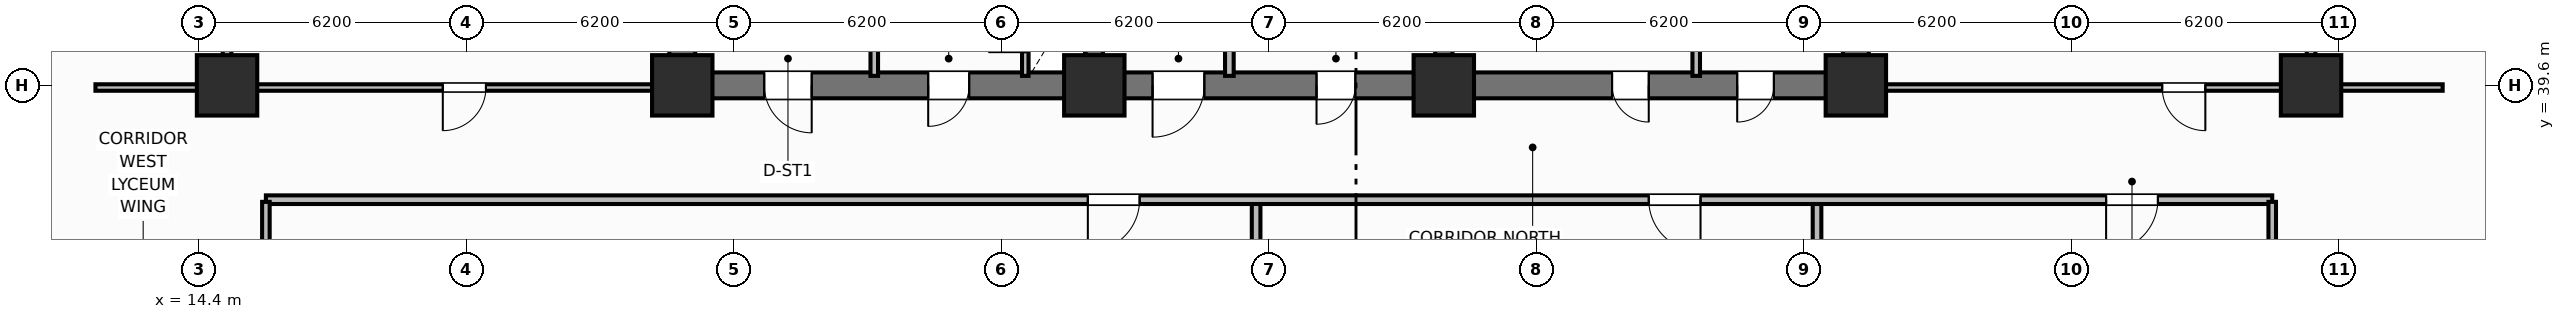
"""IFC4 building model, lengths in metres.
Left out: names, types, materials, properties, quantities, classifications, styles, units other than length and angle.
Written with IfcOpenShell. Run it as: python <this file> out.ifc"""

import sys

from ifc_helpers import new_model, si_unit, direction, frame, frame_2d, origin, origin_2d, place, context, subcontext, project, spatial, rectangle, extrude, element, fill, save


model = new_model("IFC4")
c1 = context("Model", 3, precision=1e-05, world=origin(), true_north=direction((0.0, 1.0)))
c2 = subcontext(c1, "Body", "Model", "MODEL_VIEW")
j1 = project(units=[si_unit("LENGTHUNIT", "METRE"), si_unit("PLANEANGLEUNIT", "RADIAN")], contexts=[c1])
p1 = place(None, origin())
s1 = spatial("IfcSite", under=j1, at=p1, CompositionType="ELEMENT")
p2 = place(p1, origin())
s2 = spatial("IfcBuilding", under=s1, at=p2, CompositionType="ELEMENT")
p3 = place(p2, frame((0.0, 0.0, 20.1)))
s3 = spatial("IfcBuildingStorey", under=s2, at=p3, CompositionType="ELEMENT", Elevation=20.1)
for number, where, z_axis, x_axis in (
    (1, (25.6, 39.9, 0.0), (0.0, 0.0, 1.0), (0.0, 1.0, 0.0)),
    (2, (52.8, 39.9, 0.0), (0.0, 0.0, 1.0), (0.0, 1.0, 0.0)),
):
    element("IfcWall", number, at=place(p3, frame(where, z_axis=z_axis, x_axis=x_axis)), inside=s3, PredefinedType="SHEAR", context=c2, shape_type="SweptSolid", body=[
        extrude(rectangle(XDim=5.6, YDim=0.6, at=frame_2d((2.8, 0.0))), origin(), (0.0, 0.0, 1.0), 4.5),
    ])
p4 = place(p3, frame((52.8, 39.6, 0.0), z_axis=(0.0, 0.0, 1.0), x_axis=(-1.0, 0.0, 0.0)))
e3 = element("IfcWall", 3, at=p4, inside=s3, PredefinedType="SHEAR", context=c2, shape_type="SweptSolid", body=[
    extrude(rectangle(XDim=27.2, YDim=0.6, at=frame_2d((13.6, 0.0))), origin(), (0.0, 0.0, 1.0), 4.5),
])
p5 = place(p4, frame((24.2, 0.0, 0.0)))
e4 = element("IfcOpeningElement", 4, at=p5, cuts=e3, PredefinedType="OPENING", context=c2, shape_type="SweptSolid", body=[
    extrude(rectangle(XDim=1.1, YDim=2.15, at=frame_2d((0.55, 1.075))), frame((0.0, 0.31, 0.0), z_axis=(0.0, -1.0, 0.0), x_axis=(1.0, 0.0, 0.0)), (0.0, 0.0, 1.0), 0.62),
])
p6 = place(p4, frame((20.55, 0.0, 0.0)))
e5 = element("IfcOpeningElement", 5, at=p6, cuts=e3, PredefinedType="OPENING", context=c2, shape_type="SweptSolid", body=[
    extrude(rectangle(XDim=0.95, YDim=2.1, at=frame_2d((0.475, 1.05))), frame((0.0, 0.31, 0.0), z_axis=(0.0, -1.0, 0.0), x_axis=(1.0, 0.0, 0.0)), (0.0, 0.0, 1.0), 0.62),
])
p7 = place(p4, frame((15.1, 0.0, 0.0)))
e6 = element("IfcOpeningElement", 6, at=p7, cuts=e3, PredefinedType="OPENING", context=c2, shape_type="SweptSolid", body=[
    extrude(rectangle(XDim=1.2, YDim=2.15, at=frame_2d((0.6, 1.075))), frame((0.0, 0.31, 0.0), z_axis=(0.0, -1.0, 0.0), x_axis=(1.0, 0.0, 0.0)), (0.0, 0.0, 1.0), 0.62),
])
p8 = place(p4, frame((11.6, 0.0, 0.0)))
e7 = element("IfcOpeningElement", 7, at=p8, cuts=e3, PredefinedType="OPENING", context=c2, shape_type="SweptSolid", body=[
    extrude(rectangle(XDim=0.9, YDim=2.1, at=frame_2d((0.45, 1.05))), frame((0.0, 0.31, 0.0), z_axis=(0.0, -1.0, 0.0), x_axis=(1.0, 0.0, 0.0)), (0.0, 0.0, 1.0), 0.62),
])
p9 = place(p4, frame((4.8, 0.0, 0.0)))
e8 = element("IfcOpeningElement", 8, at=p9, cuts=e3, PredefinedType="OPENING", context=c2, shape_type="SweptSolid", body=[
    extrude(rectangle(XDim=0.85, YDim=2.1, at=frame_2d((0.425, 1.05))), frame((0.0, 0.31, 0.0), z_axis=(0.0, -1.0, 0.0), x_axis=(1.0, 0.0, 0.0)), (0.0, 0.0, 1.0), 0.62),
])
p10 = place(p4, frame((1.9, 0.0, 0.0)))
e9 = element("IfcOpeningElement", 9, at=p10, cuts=e3, PredefinedType="OPENING", context=c2, shape_type="SweptSolid", body=[
    extrude(rectangle(XDim=0.85, YDim=2.1, at=frame_2d((0.425, 1.05))), frame((0.0, 0.31, 0.0), z_axis=(0.0, -1.0, 0.0), x_axis=(1.0, 0.0, 0.0)), (0.0, 0.0, 1.0), 0.62),
])
for number, where, z_axis, x_axis in (
    (10, (35.15, 39.9, 0.0), (0.0, 0.0, 1.0), (0.0, 1.0, 0.0)),
    (11, (43.25, 39.9, 0.0), (0.0, 0.0, 1.0), (0.0, 1.0, 0.0)),
):
    element("IfcWall", number, at=place(p3, frame(where, z_axis=z_axis, x_axis=x_axis)), inside=s3, PredefinedType="SHEAR", context=c2, shape_type="SweptSolid", body=[
        extrude(rectangle(XDim=5.6, YDim=0.4, at=frame_2d((2.8, 0.0))), origin(), (0.0, 0.0, 1.0), 4.5),
    ])
for number, where, z_axis, x_axis in (
    (12, (25.6, 39.6, 0.0), (0.0, 0.0, 1.0), (1.0, 0.0, 0.0)),
    (13, (35.15, 39.6, 0.0), (0.0, 0.0, 1.0), (1.0, 0.0, 0.0)),
    (14, (43.25, 39.6, 0.0), (0.0, 0.0, 1.0), (1.0, 0.0, 0.0)),
    (15, (52.8, 39.6, 0.0), (0.0, 0.0, 1.0), (1.0, 0.0, 0.0)),
    (16, (15.05, 39.6, 0.0), (0.0, 0.0, 1.0), (1.0, 0.0, 0.0)),
    (17, (63.35, 39.6, 0.0), (0.0, 0.0, 1.0), (1.0, 0.0, 0.0)),
):
    element("IfcColumn", number, at=place(p3, frame(where, z_axis=z_axis, x_axis=x_axis)), inside=s3, PredefinedType="COLUMN", context=c2, shape_type="SweptSolid", body=[
        extrude(rectangle(XDim=1.4, YDim=1.4, at=origin_2d()), origin(), (0.0, 0.0, 1.0), 4.5),
    ])
p11 = place(p3, frame((33.55, 39.82, 0.0), z_axis=(0.0, 0.0, 1.0), x_axis=(0.0, 1.0, 0.0)))
e18 = element("IfcWall", 18, at=p11, inside=s3, PredefinedType="PARTITIONING", context=c2, shape_type="SweptSolid", body=[
    extrude(rectangle(XDim=2.13, YDim=0.15, at=frame_2d((1.065, 0.0))), origin(), (0.0, 0.0, 1.0), 2.26),
])
p12 = place(p11, frame((0.55, 0.0, 0.0)))
e19 = element("IfcOpeningElement", 19, at=p12, cuts=e18, PredefinedType="OPENING", context=c2, shape_type="SweptSolid", body=[
    extrude(rectangle(XDim=0.85, YDim=2.05, at=frame_2d((0.425, 1.025))), frame((0.0, 0.085, 0.0), z_axis=(0.0, -1.0, 0.0), x_axis=(1.0, 0.0, 0.0)), (0.0, 0.0, 1.0), 0.17),
])
p13 = place(p3, frame((30.05, 39.82, 0.0), z_axis=(0.0, 0.0, 1.0), x_axis=(0.0, 1.0, 0.0)))
e20 = element("IfcWall", 20, at=p13, inside=s3, PredefinedType="PARTITIONING", context=c2, shape_type="SweptSolid", body=[
    extrude(rectangle(XDim=2.13, YDim=0.175, at=frame_2d((1.065, 0.0))), origin(), (0.0, 0.0, 1.0), 2.26),
])
p14 = place(p3, frame((38.28, 39.82, 0.0), z_axis=(0.0, 0.0, 1.0), x_axis=(0.0, 1.0, 0.0)))
e21 = element("IfcWall", 21, at=p14, inside=s3, PredefinedType="PARTITIONING", context=c2, shape_type="SweptSolid", body=[
    extrude(rectangle(XDim=2.73, YDim=0.2, at=frame_2d((1.365, 0.0))), origin(), (0.0, 0.0, 1.0), 2.26),
])
p15 = place(p3, frame((49.1, 39.82, 0.0), z_axis=(0.0, 0.0, 1.0), x_axis=(0.0, 1.0, 0.0)))
e22 = element("IfcWall", 22, at=p15, inside=s3, PredefinedType="PARTITIONING", context=c2, shape_type="SweptSolid", body=[
    extrude(rectangle(XDim=2.73, YDim=0.175, at=frame_2d((1.365, 0.0))), origin(), (0.0, 0.0, 1.0), 2.26),
])
for number, where, z_axis, x_axis in (
    (23, (38.9, 19.5, 0.0), (0.0, 0.0, 1.0), (0.0, 1.0, 0.0)),
    (24, (51.9, 19.5, 0.0), (0.0, 0.0, 1.0), (0.0, 1.0, 0.0)),
):
    element("IfcWall", number, at=place(p3, frame(where, z_axis=z_axis, x_axis=x_axis)), inside=s3, PredefinedType="PARTITIONING", context=c2, shape_type="SweptSolid", body=[
        extrude(rectangle(XDim=17.4, YDim=0.2, at=frame_2d((8.7, 0.0))), origin(), (0.0, 0.0, 1.0), 2.26),
    ])
p16 = place(p3, frame((62.45, 36.95, 0.0), z_axis=(0.0, 0.0, 1.0), x_axis=(-1.0, 0.0, 0.0)))
e25 = element("IfcWall", 25, at=p16, inside=s3, PredefinedType="PARTITIONING", context=c2, shape_type="SweptSolid", body=[
    extrude(rectangle(XDim=46.5, YDim=0.2, at=frame_2d((23.25, 0.0))), origin(), (0.0, 0.0, 1.0), 2.26),
])
p17 = place(p16, frame((26.25, 0.0, 0.0)))
e26 = element("IfcOpeningElement", 26, at=p17, cuts=e25, PredefinedType="OPENING", context=c2, shape_type="SweptSolid", body=[
    extrude(rectangle(XDim=1.2, YDim=2.15, at=frame_2d((0.6, 1.075))), frame((0.0, 0.11, 0.0), z_axis=(0.0, -1.0, 0.0), x_axis=(1.0, 0.0, 0.0)), (0.0, 0.0, 1.0), 0.22),
])
p18 = place(p16, frame((13.25, 0.0, 0.0)))
e27 = element("IfcOpeningElement", 27, at=p18, cuts=e25, PredefinedType="OPENING", context=c2, shape_type="SweptSolid", body=[
    extrude(rectangle(XDim=1.2, YDim=2.15, at=frame_2d((0.6, 1.075))), frame((0.0, 0.11, 0.0), z_axis=(0.0, -1.0, 0.0), x_axis=(1.0, 0.0, 0.0)), (0.0, 0.0, 1.0), 0.22),
])
p19 = place(p16, frame((2.65, 0.0, 0.0)))
e28 = element("IfcOpeningElement", 28, at=p19, cuts=e25, PredefinedType="OPENING", context=c2, shape_type="SweptSolid", body=[
    extrude(rectangle(XDim=1.2, YDim=2.15, at=frame_2d((0.6, 1.075))), frame((0.0, 0.11, 0.0), z_axis=(0.0, -1.0, 0.0), x_axis=(1.0, 0.0, 0.0)), (0.0, 0.0, 1.0), 0.22),
])
for number, where, z_axis, x_axis in (
    (29, (15.95, 19.5, 0.0), (0.0, 0.0, 1.0), (0.0, 1.0, 0.0)),
    (30, (62.45, 19.5, 0.0), (0.0, 0.0, 1.0), (0.0, 1.0, 0.0)),
):
    element("IfcWall", number, at=place(p3, frame(where, z_axis=z_axis, x_axis=x_axis)), inside=s3, PredefinedType="PARTITIONING", context=c2, shape_type="SweptSolid", body=[
        extrude(rectangle(XDim=17.4, YDim=0.175, at=frame_2d((8.7, 0.0))), origin(), (0.0, 0.0, 1.0), 2.26),
    ])
p20 = place(p3, frame((15.05, 39.6, 0.0), z_axis=(0.0, 0.0, 1.0), x_axis=(0.0, 1.0, 0.0)))
e31 = element("IfcWall", 31, at=p20, inside=s3, PredefinedType="PARTITIONING", context=c2, shape_type="SweptSolid", body=[
    extrude(rectangle(XDim=16.4, YDim=0.2, at=frame_2d((8.2, 0.0))), origin(), (0.0, 0.0, 1.0), 2.26),
])
p21 = place(p20, frame((3.4, 0.0, 0.0)))
e32 = element("IfcOpeningElement", 32, at=p21, cuts=e31, PredefinedType="OPENING", context=c2, shape_type="SweptSolid", body=[
    extrude(rectangle(XDim=1.0, YDim=2.15, at=frame_2d((0.5, 1.075))), frame((0.0, 0.11, 0.0), z_axis=(0.0, -1.0, 0.0), x_axis=(1.0, 0.0, 0.0)), (0.0, 0.0, 1.0), 0.22),
])
p22 = place(p3, frame((25.25, 39.55, 0.0), z_axis=(0.0, 0.0, 1.0), x_axis=(-1.0, 0.0, 0.0)))
e33 = element("IfcWall", 33, at=p22, inside=s3, PredefinedType="PARTITIONING", context=c2, shape_type="SweptSolid", body=[
    extrude(rectangle(XDim=13.25, YDim=0.15, at=frame_2d((6.625, 0.0))), origin(), (0.0, 0.0, 1.0), 2.26),
])
p23 = place(p22, frame((4.2, 0.0, 0.0)))
e34 = element("IfcOpeningElement", 34, at=p23, cuts=e33, PredefinedType="OPENING", context=c2, shape_type="SweptSolid", body=[
    extrude(rectangle(XDim=1.0, YDim=2.15, at=frame_2d((0.5, 1.075))), frame((0.0, 0.085, 0.0), z_axis=(0.0, -1.0, 0.0), x_axis=(1.0, 0.0, 0.0)), (0.0, 0.0, 1.0), 0.17),
])
p24 = place(p3, frame((63.35, 39.6, 0.0), z_axis=(0.0, 0.0, 1.0), x_axis=(0.0, 1.0, 0.0)))
e35 = element("IfcWall", 35, at=p24, inside=s3, PredefinedType="PARTITIONING", context=c2, shape_type="SweptSolid", body=[
    extrude(rectangle(XDim=16.4, YDim=0.2, at=frame_2d((8.2, 0.0))), origin(), (0.0, 0.0, 1.0), 2.26),
])
p25 = place(p24, frame((3.4, 0.0, 0.0)))
e36 = element("IfcOpeningElement", 36, at=p25, cuts=e35, PredefinedType="OPENING", context=c2, shape_type="SweptSolid", body=[
    extrude(rectangle(XDim=1.0, YDim=2.15, at=frame_2d((0.5, 1.075))), frame((0.0, 0.11, 0.0), z_axis=(0.0, -1.0, 0.0), x_axis=(1.0, 0.0, 0.0)), (0.0, 0.0, 1.0), 0.22),
])
p26 = place(p3, frame((66.4, 39.55, 0.0), z_axis=(0.0, 0.0, 1.0), x_axis=(-1.0, 0.0, 0.0)))
e37 = element("IfcWall", 37, at=p26, inside=s3, PredefinedType="PARTITIONING", context=c2, shape_type="SweptSolid", body=[
    extrude(rectangle(XDim=13.25, YDim=0.15, at=frame_2d((6.625, 0.0))), origin(), (0.0, 0.0, 1.0), 2.26),
])
p27 = place(p26, frame((5.5, 0.0, 0.0)))
e38 = element("IfcOpeningElement", 38, at=p27, cuts=e37, PredefinedType="OPENING", context=c2, shape_type="SweptSolid", body=[
    extrude(rectangle(XDim=1.0, YDim=2.15, at=frame_2d((0.5, 1.075))), frame((0.0, 0.085, 0.0), z_axis=(0.0, -1.0, 0.0), x_axis=(1.0, 0.0, 0.0)), (0.0, 0.0, 1.0), 0.17),
])
p28 = place(p12, origin())
e39 = element("IfcDoor", 39, at=p28, inside=s3, OperationType="SINGLE_SWING_LEFT", PredefinedType="TRAPDOOR", context=c2, shape_type="SweptSolid", body=[
    extrude(rectangle(XDim=0.85, YDim=2.05, at=frame_2d((0.425, 1.025))), frame((0.0, 0.025, 0.0), z_axis=(0.0, -1.0, 0.0), x_axis=(1.0, 0.0, 0.0)), (0.0, 0.0, 1.0), 0.05),
])
fill(e19, e39)
p29 = place(p17, origin())
e40 = element("IfcDoor", 40, at=p29, inside=s3, OperationType="SINGLE_SWING_RIGHT", PredefinedType="DOOR", context=c2, shape_type="SweptSolid", body=[
    extrude(rectangle(XDim=1.2, YDim=2.15, at=frame_2d((0.6, 1.075))), frame((0.0, 0.025, 0.0), z_axis=(0.0, -1.0, 0.0), x_axis=(1.0, 0.0, 0.0)), (0.0, 0.0, 1.0), 0.05),
])
fill(e26, e40)
p30 = place(p18, origin())
e41 = element("IfcDoor", 41, at=p30, inside=s3, OperationType="SINGLE_SWING_LEFT", PredefinedType="DOOR", context=c2, shape_type="SweptSolid", body=[
    extrude(rectangle(XDim=1.2, YDim=2.15, at=frame_2d((0.6, 1.075))), frame((0.0, 0.025, 0.0), z_axis=(0.0, -1.0, 0.0), x_axis=(1.0, 0.0, 0.0)), (0.0, 0.0, 1.0), 0.05),
])
fill(e27, e41)
p31 = place(p19, origin())
e42 = element("IfcDoor", 42, at=p31, inside=s3, OperationType="SINGLE_SWING_RIGHT", PredefinedType="DOOR", context=c2, shape_type="SweptSolid", body=[
    extrude(rectangle(XDim=1.2, YDim=2.15, at=frame_2d((0.6, 1.075))), frame((0.0, 0.025, 0.0), z_axis=(0.0, -1.0, 0.0), x_axis=(1.0, 0.0, 0.0)), (0.0, 0.0, 1.0), 0.05),
])
fill(e28, e42)
p32 = place(p23, origin())
e43 = element("IfcDoor", 43, at=p32, inside=s3, OperationType="SINGLE_SWING_RIGHT", PredefinedType="DOOR", context=c2, shape_type="SweptSolid", body=[
    extrude(rectangle(XDim=1.0, YDim=2.15, at=frame_2d((0.5, 1.075))), frame((0.0, 0.025, 0.0), z_axis=(0.0, -1.0, 0.0), x_axis=(1.0, 0.0, 0.0)), (0.0, 0.0, 1.0), 0.05),
])
fill(e34, e43)
p33 = place(p27, origin())
e44 = element("IfcDoor", 44, at=p33, inside=s3, OperationType="SINGLE_SWING_LEFT", PredefinedType="DOOR", context=c2, shape_type="SweptSolid", body=[
    extrude(rectangle(XDim=1.0, YDim=2.15, at=frame_2d((0.5, 1.075))), frame((0.0, 0.025, 0.0), z_axis=(0.0, -1.0, 0.0), x_axis=(1.0, 0.0, 0.0)), (0.0, 0.0, 1.0), 0.05),
])
fill(e38, e44)
p34 = place(p5, origin())
e45 = element("IfcDoor", 45, at=p34, inside=s3, OperationType="SINGLE_SWING_LEFT", PredefinedType="DOOR", context=c2, shape_type="SweptSolid", body=[
    extrude(rectangle(XDim=1.1, YDim=2.15, at=frame_2d((0.55, 1.075))), frame((0.0, 0.025, 0.0), z_axis=(0.0, -1.0, 0.0), x_axis=(1.0, 0.0, 0.0)), (0.0, 0.0, 1.0), 0.05),
])
fill(e4, e45)
p35 = place(p6, origin())
e46 = element("IfcDoor", 46, at=p35, inside=s3, OperationType="SINGLE_SWING_RIGHT", PredefinedType="DOOR", context=c2, shape_type="SweptSolid", body=[
    extrude(rectangle(XDim=0.95, YDim=2.1, at=frame_2d((0.475, 1.05))), frame((0.0, 0.025, 0.0), z_axis=(0.0, -1.0, 0.0), x_axis=(1.0, 0.0, 0.0)), (0.0, 0.0, 1.0), 0.05),
])
fill(e5, e46)
p36 = place(p7, origin())
e47 = element("IfcDoor", 47, at=p36, inside=s3, OperationType="SINGLE_SWING_RIGHT", PredefinedType="DOOR", context=c2, shape_type="SweptSolid", body=[
    extrude(rectangle(XDim=1.2, YDim=2.15, at=frame_2d((0.6, 1.075))), frame((0.0, 0.025, 0.0), z_axis=(0.0, -1.0, 0.0), x_axis=(1.0, 0.0, 0.0)), (0.0, 0.0, 1.0), 0.05),
])
fill(e6, e47)
p37 = place(p8, origin())
e48 = element("IfcDoor", 48, at=p37, inside=s3, OperationType="SINGLE_SWING_RIGHT", PredefinedType="DOOR", context=c2, shape_type="SweptSolid", body=[
    extrude(rectangle(XDim=0.9, YDim=2.1, at=frame_2d((0.45, 1.05))), frame((0.0, 0.025, 0.0), z_axis=(0.0, -1.0, 0.0), x_axis=(1.0, 0.0, 0.0)), (0.0, 0.0, 1.0), 0.05),
])
fill(e7, e48)
p38 = place(p9, origin())
e49 = element("IfcDoor", 49, at=p38, inside=s3, OperationType="SINGLE_SWING_LEFT", PredefinedType="DOOR", context=c2, shape_type="SweptSolid", body=[
    extrude(rectangle(XDim=0.85, YDim=2.1, at=frame_2d((0.425, 1.05))), frame((0.0, 0.025, 0.0), z_axis=(0.0, -1.0, 0.0), x_axis=(1.0, 0.0, 0.0)), (0.0, 0.0, 1.0), 0.05),
])
fill(e8, e49)
p39 = place(p10, origin())
e50 = element("IfcDoor", 50, at=p39, inside=s3, OperationType="SINGLE_SWING_RIGHT", PredefinedType="DOOR", context=c2, shape_type="SweptSolid", body=[
    extrude(rectangle(XDim=0.85, YDim=2.1, at=frame_2d((0.425, 1.05))), frame((0.0, 0.025, 0.0), z_axis=(0.0, -1.0, 0.0), x_axis=(1.0, 0.0, 0.0)), (0.0, 0.0, 1.0), 0.05),
])
fill(e9, e50)
save(model, sys.argv[1])
